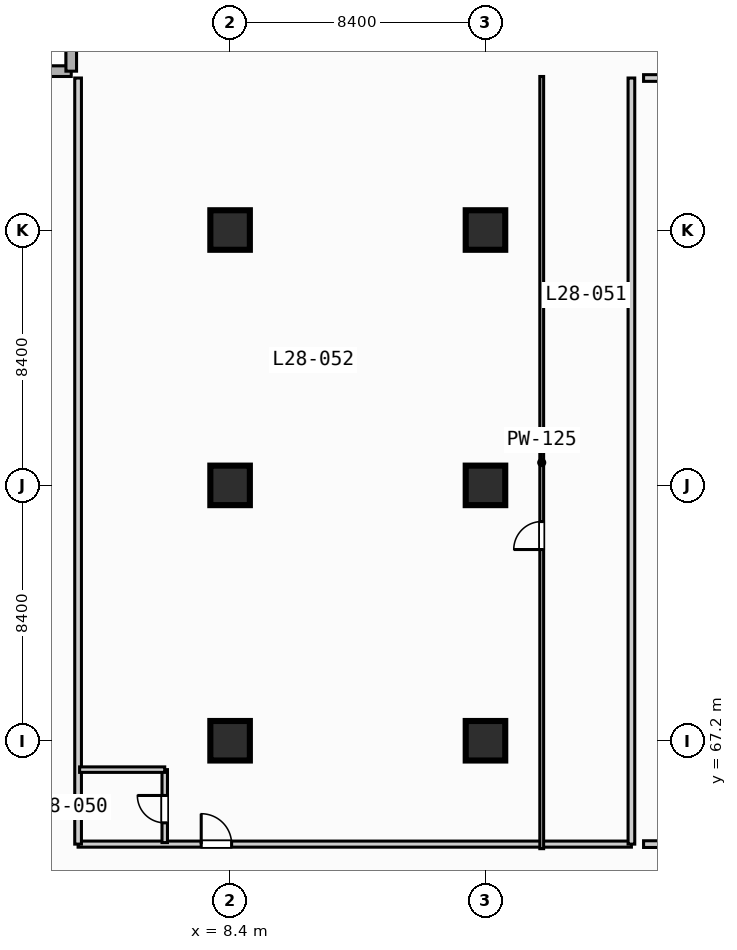
"""IFC4 building model, lengths in metres.
Left out: names, types, materials, properties, quantities, classifications, styles, units other than length and angle.
Written with IfcOpenShell. Run it as: python <this file> out.ifc"""

import sys

from ifc_helpers import new_model, si_unit, direction, frame, frame_2d, origin, origin_2d, place, context, subcontext, project, spatial, rectangle, extrude, element, fill, save


model = new_model("IFC4")
c1 = context("Model", 3, precision=1e-05, world=origin(), true_north=direction((0.0, 1.0)))
c2 = subcontext(c1, "Body", "Model", "MODEL_VIEW")
j1 = project(units=[si_unit("LENGTHUNIT", "METRE"), si_unit("PLANEANGLEUNIT", "RADIAN")], contexts=[c1])
p1 = place(None, origin())
s1 = spatial("IfcSite", under=j1, at=p1, CompositionType="ELEMENT")
p2 = place(p1, origin())
s2 = spatial("IfcBuilding", under=s1, at=p2, CompositionType="ELEMENT")
p3 = place(p2, frame((0.0, 0.0, 119.0)))
s3 = spatial("IfcBuildingStorey", under=s2, at=p3, CompositionType="ELEMENT", Elevation=119.0)
for number, where, z_axis, x_axis in (
    (1, (8.4, 67.2, 0.0), (0.0, 0.0, 1.0), (1.0, 0.0, 0.0)),
    (2, (8.4, 75.6, 0.0), (0.0, 0.0, 1.0), (1.0, 0.0, 0.0)),
    (3, (8.4, 84.0, 0.0), (0.0, 0.0, 1.0), (1.0, 0.0, 0.0)),
    (4, (16.8, 67.2, 0.0), (0.0, 0.0, 1.0), (1.0, 0.0, 0.0)),
    (5, (16.8, 75.6, 0.0), (0.0, 0.0, 1.0), (1.0, 0.0, 0.0)),
    (6, (16.8, 84.0, 0.0), (0.0, 0.0, 1.0), (1.0, 0.0, 0.0)),
):
    element("IfcColumn", number, at=place(p3, frame(where, z_axis=z_axis, x_axis=x_axis)), inside=s3, PredefinedType="COLUMN", context=c2, shape_type="SweptSolid", body=[
        extrude(rectangle(XDim=1.3, YDim=1.3, at=origin_2d()), origin(), (0.0, 0.0, 1.0), 3.8),
    ])
for number, where, z_axis, x_axis in (
    (7, (0.175, 89.225, 0.0), (0.0, 0.0, 1.0), (1.0, 0.0, 0.0)),
    (8, (3.175, 89.225, 0.0), (0.0, 0.0, 1.0), (0.0, 1.0, 0.0)),
):
    element("IfcWall", number, at=place(p3, frame(where, z_axis=z_axis, x_axis=x_axis)), inside=s3, PredefinedType="STANDARD", context=c2, shape_type="SweptSolid", body=[
        extrude(rectangle(XDim=3.0, YDim=0.35, at=frame_2d((1.5, 0.0))), origin(), (0.0, 0.0, 1.0), 3.55),
    ])
p4 = place(p3, frame((3.4, 63.8, 0.0), z_axis=(0.0, 0.0, 1.0), x_axis=(1.0, 0.0, 0.0)))
e9 = element("IfcWall", 9, at=p4, inside=s3, PredefinedType="PARTITIONING", context=c2, shape_type="SweptSolid", body=[
    extrude(rectangle(XDim=18.2, YDim=0.2, at=frame_2d((9.1, 0.0))), origin(), (0.0, 0.0, 1.0), 3.55),
])
p5 = place(p4, frame((4.05, 0.0, 0.0)))
e10 = element("IfcOpeningElement", 10, at=p5, cuts=e9, PredefinedType="OPENING", context=c2, shape_type="SweptSolid", body=[
    extrude(rectangle(XDim=1.0, YDim=2.15, at=frame_2d((0.5, 1.075))), frame((0.0, 0.11, 0.0), z_axis=(0.0, -1.0, 0.0), x_axis=(1.0, 0.0, 0.0)), (0.0, 0.0, 1.0), 0.22),
])
for number, where, z_axis, x_axis in (
    (11, (21.6, 63.8, 0.0), (0.0, 0.0, 1.0), (0.0, 1.0, 0.0)),
    (12, (3.4, 63.8, 0.0), (0.0, 0.0, 1.0), (0.0, 1.0, 0.0)),
):
    element("IfcWall", number, at=place(p3, frame(where, z_axis=z_axis, x_axis=x_axis)), inside=s3, PredefinedType="PARTITIONING", context=c2, shape_type="SweptSolid", body=[
        extrude(rectangle(XDim=25.2, YDim=0.22, at=frame_2d((12.6, 0.0))), origin(), (0.0, 0.0, 1.0), 3.55),
    ])
p6 = place(p3, frame((6.25, 63.85, 0.0), z_axis=(0.0, 0.0, 1.0), x_axis=(0.0, 1.0, 0.0)))
e13 = element("IfcWall", 13, at=p6, inside=s3, PredefinedType="PLUMBINGWALL", context=c2, shape_type="SweptSolid", body=[
    extrude(rectangle(XDim=2.4, YDim=0.18, at=frame_2d((1.2, 0.0))), origin(), (0.0, 0.0, 1.0), 3.55),
])
p7 = place(p6, frame((0.65, 0.0, 0.0)))
e14 = element("IfcOpeningElement", 14, at=p7, cuts=e13, PredefinedType="OPENING", context=c2, shape_type="SweptSolid", body=[
    extrude(rectangle(XDim=0.9, YDim=2.1, at=frame_2d((0.45, 1.05))), frame((0.0, 0.1, 0.0), z_axis=(0.0, -1.0, 0.0), x_axis=(1.0, 0.0, 0.0)), (0.0, 0.0, 1.0), 0.2),
])
p8 = place(p3, frame((3.45, 66.25, 0.0), z_axis=(0.0, 0.0, 1.0), x_axis=(1.0, 0.0, 0.0)))
e15 = element("IfcWall", 15, at=p8, inside=s3, PredefinedType="PLUMBINGWALL", context=c2, shape_type="SweptSolid", body=[
    extrude(rectangle(XDim=2.8, YDim=0.18, at=frame_2d((1.4, 0.0))), origin(), (0.0, 0.0, 1.0), 3.55),
])
p9 = place(p3, frame((18.65, 63.65, 0.0), z_axis=(0.0, 0.0, 1.0), x_axis=(0.0, 1.0, 0.0)))
e16 = element("IfcWall", 16, at=p9, inside=s3, PredefinedType="PARTITIONING", context=c2, shape_type="SweptSolid", body=[
    extrude(rectangle(XDim=25.4, YDim=0.125, at=frame_2d((12.7, 0.0))), origin(), (0.0, 0.0, 1.0), 3.55),
])
p10 = place(p9, frame((9.84, 0.0, 0.0)))
e17 = element("IfcOpeningElement", 17, at=p10, cuts=e16, PredefinedType="OPENING", context=c2, shape_type="SweptSolid", body=[
    extrude(rectangle(XDim=0.92, YDim=2.1, at=frame_2d((0.46, 1.05))), frame((0.0, 0.073, 0.0), z_axis=(0.0, -1.0, 0.0), x_axis=(1.0, 0.0, 0.0)), (0.0, 0.0, 1.0), 0.145),
])
p11 = place(p3, frame((22.0, 89.0, 0.0), z_axis=(0.0, 0.0, 1.0), x_axis=(1.0, 0.0, 0.0)))
e18 = element("IfcWall", 18, at=p11, inside=s3, PredefinedType="PARTITIONING", context=c2, shape_type="SweptSolid", body=[
    extrude(rectangle(XDim=11.3, YDim=0.22, at=frame_2d((5.65, 0.0))), origin(), (0.0, 0.0, 1.0), 3.55),
])
p12 = place(p3, frame((22.0, 63.8, 0.0), z_axis=(0.0, 0.0, 1.0), x_axis=(1.0, 0.0, 0.0)))
e19 = element("IfcWall", 19, at=p12, inside=s3, PredefinedType="PARTITIONING", context=c2, shape_type="SweptSolid", body=[
    extrude(rectangle(XDim=6.0, YDim=0.22, at=frame_2d((3.0, 0.0))), origin(), (0.0, 0.0, 1.0), 3.55),
])
p13 = place(p5, origin())
e20 = element("IfcDoor", 20, at=p13, inside=s3, OperationType="SINGLE_SWING_LEFT", PredefinedType="DOOR", context=c2, shape_type="SweptSolid", body=[
    extrude(rectangle(XDim=1.0, YDim=2.15, at=frame_2d((0.5, 1.075))), frame((0.0, 0.025, 0.0), z_axis=(0.0, -1.0, 0.0), x_axis=(1.0, 0.0, 0.0)), (0.0, 0.0, 1.0), 0.05),
])
fill(e10, e20)
p14 = place(p7, origin())
e21 = element("IfcDoor", 21, at=p14, inside=s3, OperationType="SINGLE_SWING_RIGHT", PredefinedType="DOOR", context=c2, shape_type="SweptSolid", body=[
    extrude(rectangle(XDim=0.9, YDim=2.1, at=frame_2d((0.45, 1.05))), frame((0.0, 0.025, 0.0), z_axis=(0.0, -1.0, 0.0), x_axis=(1.0, 0.0, 0.0)), (0.0, 0.0, 1.0), 0.05),
])
fill(e14, e21)
p15 = place(p10, origin())
e22 = element("IfcDoor", 22, at=p15, inside=s3, OperationType="SINGLE_SWING_LEFT", PredefinedType="DOOR", context=c2, shape_type="SweptSolid", body=[
    extrude(rectangle(XDim=0.92, YDim=2.1, at=frame_2d((0.46, 1.05))), frame((0.0, 0.025, 0.0), z_axis=(0.0, -1.0, 0.0), x_axis=(1.0, 0.0, 0.0)), (0.0, 0.0, 1.0), 0.05),
])
fill(e17, e22)
save(model, sys.argv[1])
